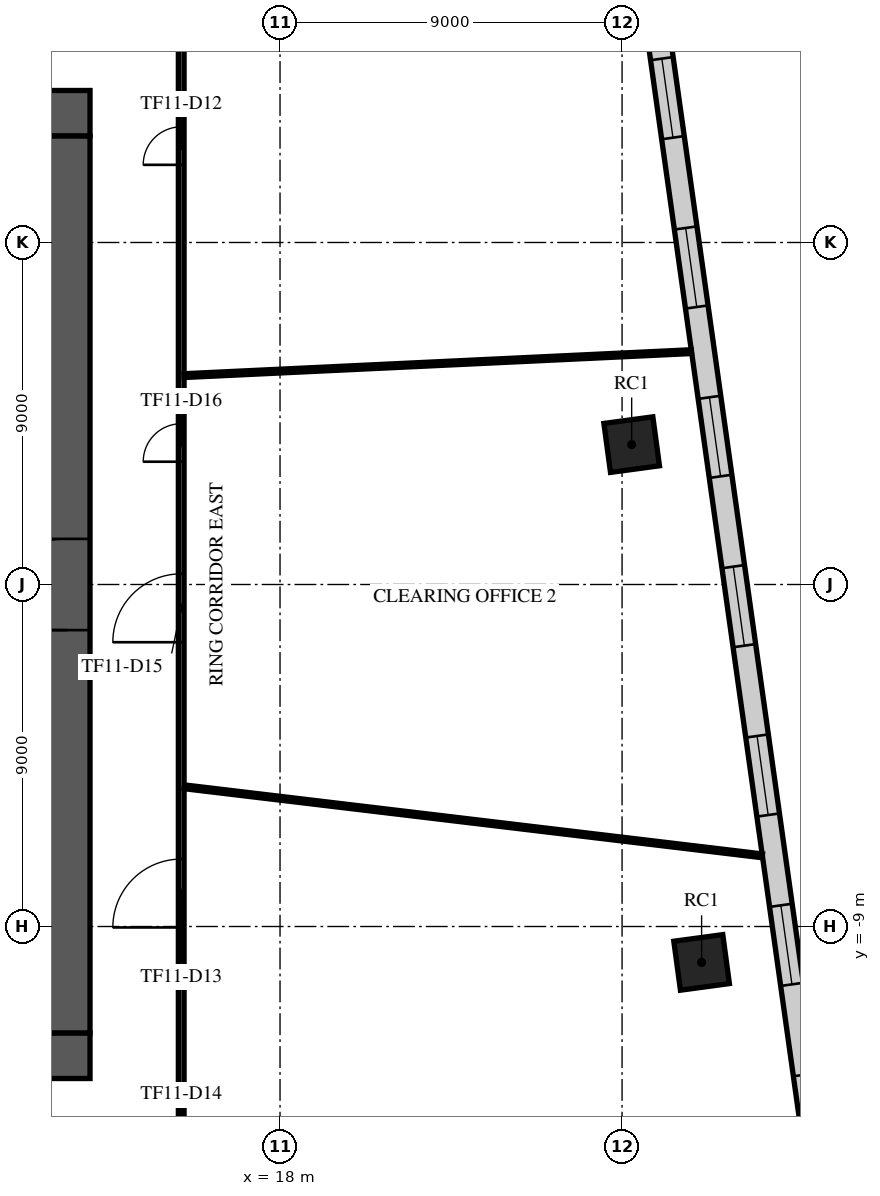
"""IFC4 building model, lengths in metres.
Left out: names, types, materials, properties, quantities, classifications, styles, units other than length and angle.
Written with IfcOpenShell. Run it as: python <this file> out.ifc"""

import sys

from ifc_helpers import new_model, si_unit, direction, frame, frame_2d, origin, origin_2d, place, context, subcontext, project, spatial, rectangle, extrude, element, fill, save


model = new_model("IFC4")
c1 = context("Model", 3, precision=1e-05, world=origin(), true_north=direction((0.0, 1.0)))
c2 = subcontext(c1, "Body", "Model", "MODEL_VIEW")
j1 = project(units=[si_unit("LENGTHUNIT", "METRE"), si_unit("PLANEANGLEUNIT", "RADIAN")], contexts=[c1])
p1 = place(None, origin())
s1 = spatial("IfcSite", under=j1, at=p1, CompositionType="ELEMENT")
p2 = place(p1, origin())
s2 = spatial("IfcBuilding", under=s1, at=p2, CompositionType="ELEMENT")
p3 = place(p2, frame((0.0, 0.0, 51.3)))
s3 = spatial("IfcBuildingStorey", under=s2, at=p3, CompositionType="ELEMENT", Elevation=51.3)
for number, where, z_axis, x_axis in (
    (1, (29.093, -9.945, 0.0), (0.0, 0.0, 1.0), (0.991, 0.134, 0.0)),
    (2, (27.253, 3.681, 0.0), (0.0, 0.0, 1.0), (0.991, 0.134, 0.0)),
):
    element("IfcColumn", number, at=place(p3, frame(where, z_axis=z_axis, x_axis=x_axis)), inside=s3, PredefinedType="COLUMN", context=c2, shape_type="SweptSolid", body=[
        extrude(rectangle(XDim=1.3, YDim=1.3, at=origin_2d()), origin(), (0.0, 0.0, 1.0), 4.2),
    ])
p4 = place(p3, frame((-13.0, 12.4, 0.0), z_axis=(0.0, 0.0, 1.0), x_axis=(1.0, 0.0, 0.0)))
e3 = element("IfcWall", 3, at=p4, inside=s3, PredefinedType="SHEAR", context=c2, shape_type="SweptSolid", body=[
    extrude(rectangle(XDim=26.0, YDim=1.2, at=frame_2d((13.0, 0.0))), origin(), (0.0, 0.0, 1.0), 3.75),
])
p5 = place(p4, frame((11.8, 0.0, 0.0)))
e4 = element("IfcOpeningElement", 4, at=p5, cuts=e3, PredefinedType="OPENING", context=c2, shape_type="SweptSolid", body=[
    extrude(rectangle(XDim=2.4, YDim=2.4, at=frame_2d((1.2, 1.2))), frame((0.0, 0.61, 0.0), z_axis=(0.0, -1.0, 0.0), x_axis=(1.0, 0.0, 0.0)), (0.0, 0.0, 1.0), 1.22),
])
p6 = place(p4, frame((22.625, 0.0, 0.0)))
e5 = element("IfcOpeningElement", 5, at=p6, cuts=e3, PredefinedType="OPENING", context=c2, shape_type="SweptSolid", body=[
    extrude(rectangle(XDim=1.2, YDim=2.1, at=frame_2d((0.6, 1.05))), frame((0.0, 0.61, 0.0), z_axis=(0.0, -1.0, 0.0), x_axis=(1.0, 0.0, 0.0)), (0.0, 0.0, 1.0), 1.22),
])
p7 = place(p4, frame((1.6, 0.0, 0.0)))
e6 = element("IfcOpeningElement", 6, at=p7, cuts=e3, PredefinedType="OPENING", context=c2, shape_type="SweptSolid", body=[
    extrude(rectangle(XDim=1.0, YDim=2.1, at=frame_2d((0.5, 1.05))), frame((0.0, 0.61, 0.0), z_axis=(0.0, -1.0, 0.0), x_axis=(1.0, 0.0, 0.0)), (0.0, 0.0, 1.0), 1.22),
])
p8 = place(p3, frame((-13.0, -12.4, 0.0), z_axis=(0.0, 0.0, 1.0), x_axis=(1.0, 0.0, 0.0)))
e7 = element("IfcWall", 7, at=p8, inside=s3, PredefinedType="SHEAR", context=c2, shape_type="SweptSolid", body=[
    extrude(rectangle(XDim=26.0, YDim=1.2, at=frame_2d((13.0, 0.0))), origin(), (0.0, 0.0, 1.0), 3.75),
])
p9 = place(p8, frame((7.9, 0.0, 0.0)))
e8 = element("IfcOpeningElement", 8, at=p9, cuts=e7, PredefinedType="OPENING", context=c2, shape_type="SweptSolid", body=[
    extrude(rectangle(XDim=2.0, YDim=2.1, at=frame_2d((1.0, 1.05))), frame((0.0, 0.61, 0.0), z_axis=(0.0, -1.0, 0.0), x_axis=(1.0, 0.0, 0.0)), (0.0, 0.0, 1.0), 1.22),
])
p10 = place(p8, frame((18.025, 0.0, 0.0)))
e9 = element("IfcOpeningElement", 9, at=p10, cuts=e7, PredefinedType="OPENING", context=c2, shape_type="SweptSolid", body=[
    extrude(rectangle(XDim=1.2, YDim=2.1, at=frame_2d((0.6, 1.05))), frame((0.0, 0.61, 0.0), z_axis=(0.0, -1.0, 0.0), x_axis=(1.0, 0.0, 0.0)), (0.0, 0.0, 1.0), 1.22),
])
p11 = place(p8, frame((2.175, 0.0, 0.0)))
e10 = element("IfcOpeningElement", 10, at=p11, cuts=e7, PredefinedType="OPENING", context=c2, shape_type="SweptSolid", body=[
    extrude(rectangle(XDim=1.2, YDim=2.1, at=frame_2d((0.6, 1.05))), frame((0.0, 0.61, 0.0), z_axis=(0.0, -1.0, 0.0), x_axis=(1.0, 0.0, 0.0)), (0.0, 0.0, 1.0), 1.22),
])
p12 = place(p8, frame((22.625, 0.0, 0.0)))
e11 = element("IfcOpeningElement", 11, at=p12, cuts=e7, PredefinedType="OPENING", context=c2, shape_type="SweptSolid", body=[
    extrude(rectangle(XDim=1.2, YDim=2.1, at=frame_2d((0.6, 1.05))), frame((0.0, 0.61, 0.0), z_axis=(0.0, -1.0, 0.0), x_axis=(1.0, 0.0, 0.0)), (0.0, 0.0, 1.0), 1.22),
])
p13 = place(p3, frame((12.4, -11.8, 0.0), z_axis=(0.0, 0.0, 1.0), x_axis=(0.0, 1.0, 0.0)))
e12 = element("IfcWall", 12, at=p13, inside=s3, PredefinedType="SHEAR", context=c2, shape_type="SweptSolid", body=[
    extrude(rectangle(XDim=23.6, YDim=1.2, at=frame_2d((11.8, 0.0))), origin(), (0.0, 0.0, 1.0), 3.75),
])
p14 = place(p13, frame((10.6, 0.0, 0.0)))
e13 = element("IfcOpeningElement", 13, at=p14, cuts=e12, PredefinedType="OPENING", context=c2, shape_type="SweptSolid", body=[
    extrude(rectangle(XDim=2.4, YDim=2.4, at=frame_2d((1.2, 1.2))), frame((0.0, 0.61, 0.0), z_axis=(0.0, -1.0, 0.0), x_axis=(1.0, 0.0, 0.0)), (0.0, 0.0, 1.0), 1.22),
])
p15 = place(p3, frame((32.873, -20.5, 0.0), z_axis=(0.0, 0.0, 1.0), x_axis=(-0.139173994734, 0.990267943129, 0.0)))
e14 = element("IfcWall", 14, at=p15, inside=s3, PredefinedType="STANDARD", context=c2, shape_type="SweptSolid", body=[
    extrude(rectangle(XDim=49.376, YDim=0.6, at=frame_2d((24.688, 0.0))), origin(), (0.0, 0.0, 1.0), 3.75),
])
p16 = place(p15, frame((1.138, 0.0, 0.9)))
e15 = element("IfcOpeningElement", 15, at=p16, cuts=e14, PredefinedType="OPENING", context=c2, shape_type="SweptSolid", body=[
    extrude(rectangle(XDim=2.1, YDim=2.1, at=frame_2d((1.05, 1.05))), frame((0.0, 0.31, 0.0), z_axis=(0.0, -1.0, 0.0), x_axis=(1.0, 0.0, 0.0)), (0.0, 0.0, 1.0), 0.62),
])
p17 = place(p15, frame((5.576, 0.0, 0.9)))
e16 = element("IfcOpeningElement", 16, at=p17, cuts=e14, PredefinedType="OPENING", context=c2, shape_type="SweptSolid", body=[
    extrude(rectangle(XDim=2.1, YDim=2.1, at=frame_2d((1.05, 1.05))), frame((0.0, 0.31, 0.0), z_axis=(0.0, -1.0, 0.0), x_axis=(1.0, 0.0, 0.0)), (0.0, 0.0, 1.0), 0.62),
])
p18 = place(p15, frame((10.076, 0.0, 0.9)))
e17 = element("IfcOpeningElement", 17, at=p18, cuts=e14, PredefinedType="OPENING", context=c2, shape_type="SweptSolid", body=[
    extrude(rectangle(XDim=2.1, YDim=2.1, at=frame_2d((1.05, 1.05))), frame((0.0, 0.31, 0.0), z_axis=(0.0, -1.0, 0.0), x_axis=(1.0, 0.0, 0.0)), (0.0, 0.0, 1.0), 0.62),
])
p19 = place(p15, frame((14.576, 0.0, 0.9)))
e18 = element("IfcOpeningElement", 18, at=p19, cuts=e14, PredefinedType="OPENING", context=c2, shape_type="SweptSolid", body=[
    extrude(rectangle(XDim=2.1, YDim=2.1, at=frame_2d((1.05, 1.05))), frame((0.0, 0.31, 0.0), z_axis=(0.0, -1.0, 0.0), x_axis=(1.0, 0.0, 0.0)), (0.0, 0.0, 1.0), 0.62),
])
p20 = place(p15, frame((19.076, 0.0, 0.9)))
e19 = element("IfcOpeningElement", 19, at=p20, cuts=e14, PredefinedType="OPENING", context=c2, shape_type="SweptSolid", body=[
    extrude(rectangle(XDim=2.1, YDim=2.1, at=frame_2d((1.05, 1.05))), frame((0.0, 0.31, 0.0), z_axis=(0.0, -1.0, 0.0), x_axis=(1.0, 0.0, 0.0)), (0.0, 0.0, 1.0), 0.62),
])
p21 = place(p15, frame((23.576, 0.0, 0.9)))
e20 = element("IfcOpeningElement", 20, at=p21, cuts=e14, PredefinedType="OPENING", context=c2, shape_type="SweptSolid", body=[
    extrude(rectangle(XDim=2.1, YDim=2.1, at=frame_2d((1.05, 1.05))), frame((0.0, 0.31, 0.0), z_axis=(0.0, -1.0, 0.0), x_axis=(1.0, 0.0, 0.0)), (0.0, 0.0, 1.0), 0.62),
])
p22 = place(p15, frame((28.076, 0.0, 0.9)))
e21 = element("IfcOpeningElement", 21, at=p22, cuts=e14, PredefinedType="OPENING", context=c2, shape_type="SweptSolid", body=[
    extrude(rectangle(XDim=2.1, YDim=2.1, at=frame_2d((1.05, 1.05))), frame((0.0, 0.31, 0.0), z_axis=(0.0, -1.0, 0.0), x_axis=(1.0, 0.0, 0.0)), (0.0, 0.0, 1.0), 0.62),
])
p23 = place(p15, frame((32.576, 0.0, 0.9)))
e22 = element("IfcOpeningElement", 22, at=p23, cuts=e14, PredefinedType="OPENING", context=c2, shape_type="SweptSolid", body=[
    extrude(rectangle(XDim=2.1, YDim=2.1, at=frame_2d((1.05, 1.05))), frame((0.0, 0.31, 0.0), z_axis=(0.0, -1.0, 0.0), x_axis=(1.0, 0.0, 0.0)), (0.0, 0.0, 1.0), 0.62),
])
p24 = place(p15, frame((37.076, 0.0, 0.9)))
e23 = element("IfcOpeningElement", 23, at=p24, cuts=e14, PredefinedType="OPENING", context=c2, shape_type="SweptSolid", body=[
    extrude(rectangle(XDim=2.1, YDim=2.1, at=frame_2d((1.05, 1.05))), frame((0.0, 0.31, 0.0), z_axis=(0.0, -1.0, 0.0), x_axis=(1.0, 0.0, 0.0)), (0.0, 0.0, 1.0), 0.62),
])
p25 = place(p15, frame((41.576, 0.0, 0.9)))
e24 = element("IfcOpeningElement", 24, at=p25, cuts=e14, PredefinedType="OPENING", context=c2, shape_type="SweptSolid", body=[
    extrude(rectangle(XDim=2.1, YDim=2.1, at=frame_2d((1.05, 1.05))), frame((0.0, 0.31, 0.0), z_axis=(0.0, -1.0, 0.0), x_axis=(1.0, 0.0, 0.0)), (0.0, 0.0, 1.0), 0.62),
])
p26 = place(p15, frame((46.076, 0.0, 0.9)))
e25 = element("IfcOpeningElement", 25, at=p26, cuts=e14, PredefinedType="OPENING", context=c2, shape_type="SweptSolid", body=[
    extrude(rectangle(XDim=2.1, YDim=2.1, at=frame_2d((1.05, 1.05))), frame((0.0, 0.31, 0.0), z_axis=(0.0, -1.0, 0.0), x_axis=(1.0, 0.0, 0.0)), (0.0, 0.0, 1.0), 0.62),
])
p27 = place(p3, frame((15.4, -15.325, 0.0), z_axis=(0.0, 0.0, 1.0), x_axis=(0.0, 1.0, 0.0)))
e26 = element("IfcWall", 26, at=p27, inside=s3, PredefinedType="PARTITIONING", context=c2, shape_type="SweptSolid", body=[
    extrude(rectangle(XDim=30.65, YDim=0.15, at=frame_2d((15.325, 0.0))), origin(), (0.0, 0.0, 1.0), 3.25),
])
p28 = place(p27, frame((26.368, 0.0, 0.0)))
e27 = element("IfcOpeningElement", 27, at=p28, cuts=e26, PredefinedType="OPENING", context=c2, shape_type="SweptSolid", body=[
    extrude(rectangle(XDim=1.0, YDim=2.1, at=frame_2d((0.5, 1.05))), frame((0.0, 0.085, 0.0), z_axis=(0.0, -1.0, 0.0), x_axis=(1.0, 0.0, 0.0)), (0.0, 0.0, 1.0), 0.17),
])
p29 = place(p27, frame((6.3, 0.0, 0.0)))
e28 = element("IfcOpeningElement", 28, at=p29, cuts=e26, PredefinedType="OPENING", context=c2, shape_type="SweptSolid", body=[
    extrude(rectangle(XDim=1.8, YDim=2.1, at=frame_2d((0.9, 1.05))), frame((0.0, 0.085, 0.0), z_axis=(0.0, -1.0, 0.0), x_axis=(1.0, 0.0, 0.0)), (0.0, 0.0, 1.0), 0.17),
])
p30 = place(p27, frame((0.3, 0.0, 0.0)))
e29 = element("IfcOpeningElement", 29, at=p30, cuts=e26, PredefinedType="OPENING", context=c2, shape_type="SweptSolid", body=[
    extrude(rectangle(XDim=1.0, YDim=2.1, at=frame_2d((0.5, 1.05))), frame((0.0, 0.085, 0.0), z_axis=(0.0, -1.0, 0.0), x_axis=(1.0, 0.0, 0.0)), (0.0, 0.0, 1.0), 0.17),
])
p31 = place(p27, frame((13.806, 0.0, 0.0)))
e30 = element("IfcOpeningElement", 30, at=p31, cuts=e26, PredefinedType="OPENING", context=c2, shape_type="SweptSolid", body=[
    extrude(rectangle(XDim=1.8, YDim=2.1, at=frame_2d((0.9, 1.05))), frame((0.0, 0.085, 0.0), z_axis=(0.0, -1.0, 0.0), x_axis=(1.0, 0.0, 0.0)), (0.0, 0.0, 1.0), 0.17),
])
p32 = place(p27, frame((18.556, 0.0, 0.0)))
e31 = element("IfcOpeningElement", 31, at=p32, cuts=e26, PredefinedType="OPENING", context=c2, shape_type="SweptSolid", body=[
    extrude(rectangle(XDim=1.0, YDim=2.1, at=frame_2d((0.5, 1.05))), frame((0.0, 0.085, 0.0), z_axis=(0.0, -1.0, 0.0), x_axis=(1.0, 0.0, 0.0)), (0.0, 0.0, 1.0), 0.17),
])
p33 = place(p3, frame((15.481, -5.324, 0.0), z_axis=(0.0, 0.0, 1.0), x_axis=(0.992944104388, -0.118583327501, 0.0)))
e32 = element("IfcWall", 32, at=p33, inside=s3, PredefinedType="PARTITIONING", context=c2, shape_type="SweptSolid", body=[
    extrude(rectangle(XDim=15.318, YDim=0.1, at=frame_2d((7.659, 0.0))), origin(), (0.0, 0.0, 1.0), 2.95),
])
p34 = place(p3, frame((15.477, 5.497, 0.0), z_axis=(0.0, 0.0, 1.0), x_axis=(0.998885062174, 0.047208395074, 0.0)))
e33 = element("IfcWall", 33, at=p34, inside=s3, PredefinedType="PARTITIONING", context=c2, shape_type="SweptSolid", body=[
    extrude(rectangle(XDim=13.363, YDim=0.1, at=frame_2d((6.682, 0.0))), origin(), (0.0, 0.0, 1.0), 2.95),
])
p35 = place(p14, origin())
e34 = element("IfcDoor", 34, at=p35, inside=s3, OperationType="SINGLE_SWING_LEFT", PredefinedType="DOOR", context=c2, shape_type="SweptSolid", body=[
    extrude(rectangle(XDim=2.4, YDim=2.4, at=frame_2d((1.2, 1.2))), frame((0.0, 0.025, 0.0), z_axis=(0.0, -1.0, 0.0), x_axis=(1.0, 0.0, 0.0)), (0.0, 0.0, 1.0), 0.05),
])
fill(e13, e34)
p36 = place(p18, origin())
e35 = element("IfcWindow", 35, at=p36, inside=s3, PartitioningType="SINGLE_PANEL", PredefinedType="WINDOW", context=c2, shape_type="SweptSolid", body=[
    extrude(rectangle(XDim=2.1, YDim=2.1, at=frame_2d((1.05, 1.05))), frame((0.0, 0.03, 0.0), z_axis=(0.0, -1.0, 0.0), x_axis=(1.0, 0.0, 0.0)), (0.0, 0.0, 1.0), 0.06),
])
fill(e17, e35)
p37 = place(p19, origin())
e36 = element("IfcWindow", 36, at=p37, inside=s3, PartitioningType="SINGLE_PANEL", PredefinedType="WINDOW", context=c2, shape_type="SweptSolid", body=[
    extrude(rectangle(XDim=2.1, YDim=2.1, at=frame_2d((1.05, 1.05))), frame((0.0, 0.03, 0.0), z_axis=(0.0, -1.0, 0.0), x_axis=(1.0, 0.0, 0.0)), (0.0, 0.0, 1.0), 0.06),
])
fill(e18, e36)
p38 = place(p20, origin())
e37 = element("IfcWindow", 37, at=p38, inside=s3, PartitioningType="SINGLE_PANEL", PredefinedType="WINDOW", context=c2, shape_type="SweptSolid", body=[
    extrude(rectangle(XDim=2.1, YDim=2.1, at=frame_2d((1.05, 1.05))), frame((0.0, 0.03, 0.0), z_axis=(0.0, -1.0, 0.0), x_axis=(1.0, 0.0, 0.0)), (0.0, 0.0, 1.0), 0.06),
])
fill(e19, e37)
p39 = place(p21, origin())
e38 = element("IfcWindow", 38, at=p39, inside=s3, PartitioningType="SINGLE_PANEL", PredefinedType="WINDOW", context=c2, shape_type="SweptSolid", body=[
    extrude(rectangle(XDim=2.1, YDim=2.1, at=frame_2d((1.05, 1.05))), frame((0.0, 0.03, 0.0), z_axis=(0.0, -1.0, 0.0), x_axis=(1.0, 0.0, 0.0)), (0.0, 0.0, 1.0), 0.06),
])
fill(e20, e38)
p40 = place(p22, origin())
e39 = element("IfcWindow", 39, at=p40, inside=s3, PartitioningType="SINGLE_PANEL", PredefinedType="WINDOW", context=c2, shape_type="SweptSolid", body=[
    extrude(rectangle(XDim=2.1, YDim=2.1, at=frame_2d((1.05, 1.05))), frame((0.0, 0.03, 0.0), z_axis=(0.0, -1.0, 0.0), x_axis=(1.0, 0.0, 0.0)), (0.0, 0.0, 1.0), 0.06),
])
fill(e21, e39)
p41 = place(p23, origin())
e40 = element("IfcWindow", 40, at=p41, inside=s3, PartitioningType="SINGLE_PANEL", PredefinedType="WINDOW", context=c2, shape_type="SweptSolid", body=[
    extrude(rectangle(XDim=2.1, YDim=2.1, at=frame_2d((1.05, 1.05))), frame((0.0, 0.03, 0.0), z_axis=(0.0, -1.0, 0.0), x_axis=(1.0, 0.0, 0.0)), (0.0, 0.0, 1.0), 0.06),
])
fill(e22, e40)
p42 = place(p28, frame((1.0, 0.0, 0.0), z_axis=(0.0, 0.0, 1.0), x_axis=(-1.0, 0.0, 0.0)))
e41 = element("IfcDoor", 41, at=p42, inside=s3, OperationType="SINGLE_SWING_LEFT", PredefinedType="DOOR", context=c2, shape_type="SweptSolid", body=[
    extrude(rectangle(XDim=1.0, YDim=2.1, at=frame_2d((0.5, 1.05))), frame((0.0, 0.025, 0.0), z_axis=(0.0, -1.0, 0.0), x_axis=(1.0, 0.0, 0.0)), (0.0, 0.0, 1.0), 0.05),
])
fill(e27, e41)
p43 = place(p29, frame((1.8, 0.0, 0.0), z_axis=(0.0, 0.0, 1.0), x_axis=(-1.0, 0.0, 0.0)))
e42 = element("IfcDoor", 42, at=p43, inside=s3, OperationType="DOUBLE_DOOR_SINGLE_SWING", PredefinedType="DOOR", context=c2, shape_type="SweptSolid", body=[
    extrude(rectangle(XDim=1.8, YDim=2.1, at=frame_2d((0.9, 1.05))), frame((0.0, 0.025, 0.0), z_axis=(0.0, -1.0, 0.0), x_axis=(1.0, 0.0, 0.0)), (0.0, 0.0, 1.0), 0.05),
])
fill(e28, e42)
p44 = place(p31, frame((1.8, 0.0, 0.0), z_axis=(0.0, 0.0, 1.0), x_axis=(-1.0, 0.0, 0.0)))
e43 = element("IfcDoor", 43, at=p44, inside=s3, OperationType="DOUBLE_DOOR_SINGLE_SWING", PredefinedType="DOOR", context=c2, shape_type="SweptSolid", body=[
    extrude(rectangle(XDim=1.8, YDim=2.1, at=frame_2d((0.9, 1.05))), frame((0.0, 0.025, 0.0), z_axis=(0.0, -1.0, 0.0), x_axis=(1.0, 0.0, 0.0)), (0.0, 0.0, 1.0), 0.05),
])
fill(e30, e43)
p45 = place(p32, frame((1.0, 0.0, 0.0), z_axis=(0.0, 0.0, 1.0), x_axis=(-1.0, 0.0, 0.0)))
e44 = element("IfcDoor", 44, at=p45, inside=s3, OperationType="SINGLE_SWING_LEFT", PredefinedType="DOOR", context=c2, shape_type="SweptSolid", body=[
    extrude(rectangle(XDim=1.0, YDim=2.1, at=frame_2d((0.5, 1.05))), frame((0.0, 0.025, 0.0), z_axis=(0.0, -1.0, 0.0), x_axis=(1.0, 0.0, 0.0)), (0.0, 0.0, 1.0), 0.05),
])
fill(e31, e44)
save(model, sys.argv[1])
